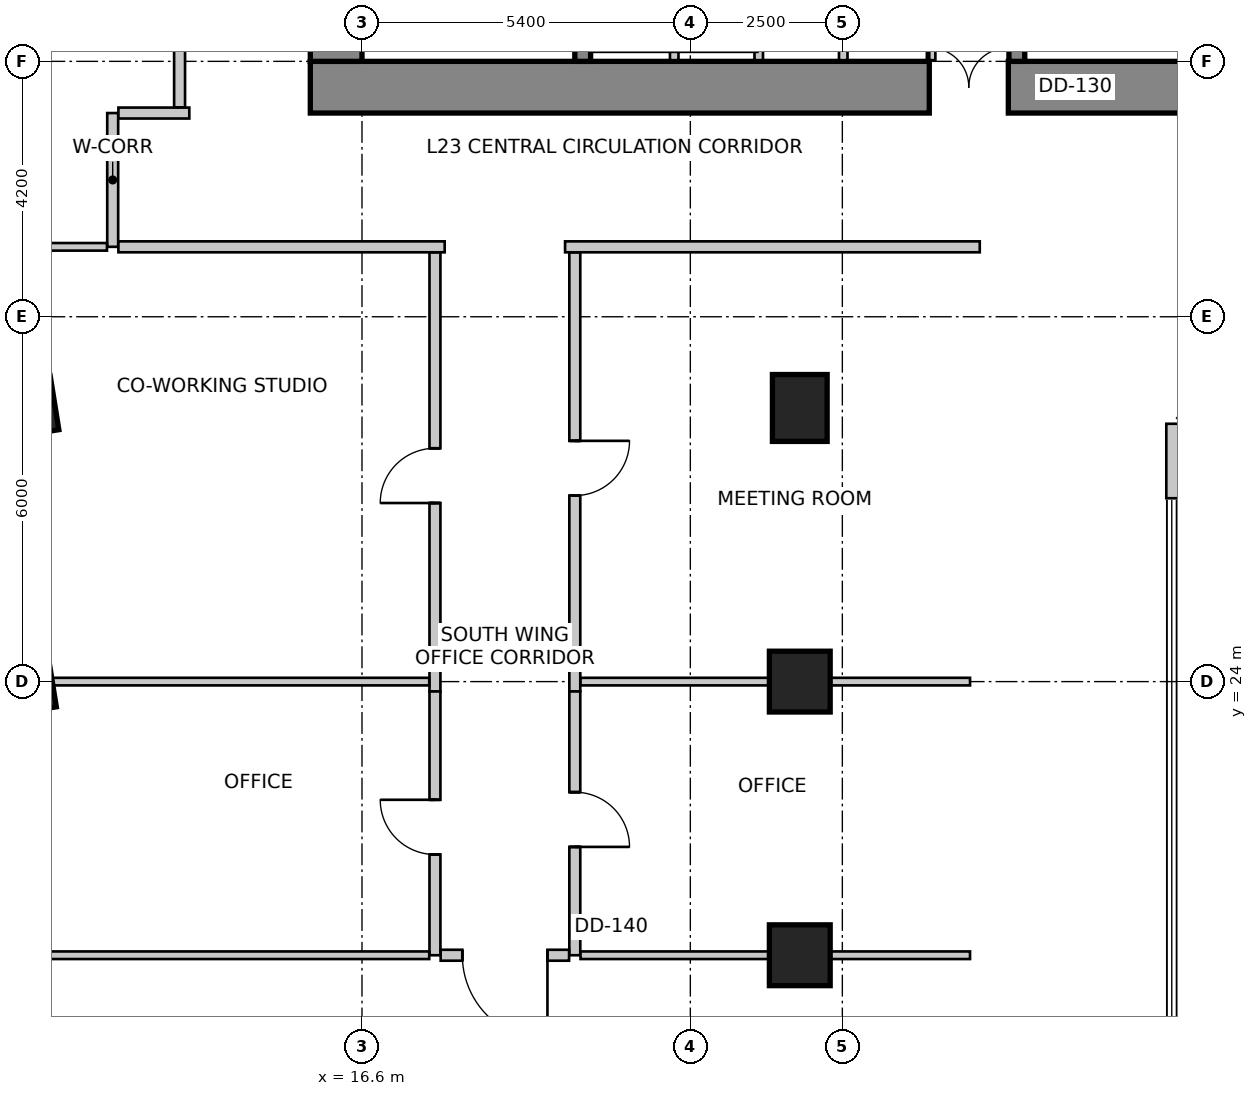
"""IFC4 building model, lengths in metres.
Left out: names, types, materials, properties, quantities, classifications, styles, units other than length and angle.
Written with IfcOpenShell. Run it as: python <this file> out.ifc"""

import sys

from ifc_helpers import new_model, si_unit, direction, frame, frame_2d, origin, origin_2d, place, context, subcontext, project, spatial, rectangle, extrude, source, transform, mapped, element, fill, save


model = new_model("IFC4")
c1 = context("Model", 3, precision=1e-05, world=origin(), true_north=direction((0.0, 1.0)))
c2 = subcontext(c1, "Body", "Model", "MODEL_VIEW")
j1 = project(units=[si_unit("LENGTHUNIT", "METRE"), si_unit("PLANEANGLEUNIT", "RADIAN")], contexts=[c1])
p1 = place(None, origin())
s1 = spatial("IfcSite", under=j1, at=p1, CompositionType="ELEMENT")
p2 = place(p1, origin())
s2 = spatial("IfcBuilding", under=s1, at=p2, CompositionType="ELEMENT")
p3 = place(p2, frame((0.0, 0.0, 95.0)))
s3 = spatial("IfcBuildingStorey", under=s2, at=p3, CompositionType="ELEMENT", Elevation=95.0)
p4 = place(p3, frame((15.75, 33.775, 0.0), z_axis=(0.0, 0.0, 1.0), x_axis=(1.0, 0.0, 0.0)))
e1 = element("IfcWall", 1, at=p4, inside=s3, PredefinedType="SHEAR", context=c2, shape_type="SweptSolid", body=[
    extrude(rectangle(XDim=16.1, YDim=0.85, at=frame_2d((8.05, 0.0))), origin(), (0.0, 0.0, 1.0), 4.0),
])
m1 = source(origin(), c2, "Body", "SweptSolid", [
    extrude(rectangle(XDim=1.3, YDim=2.15, at=frame_2d((0.65, 1.075))), frame((0.0, 0.435, 0.0), z_axis=(0.0, -1.0, 0.0), x_axis=(1.0, 0.0, 0.0)), (0.0, 0.0, 1.0), 0.87),
])
p5 = place(p4, frame((10.18, 0.0, 0.0)))
e2 = element("IfcOpeningElement", 2, at=p5, cuts=e1, PredefinedType="OPENING", context=c2, shape_type="MappedRepresentation", body=[
    mapped(m1, transform((0.0, 0.0, 0.0), scale=1.0)),
])
p6 = place(p3, frame((16.175, 34.2, 0.0), z_axis=(0.0, 0.0, 1.0), x_axis=(0.0, 1.0, 0.0)))
e3 = element("IfcWall", 3, at=p6, inside=s3, PredefinedType="SHEAR", context=c2, shape_type="SweptSolid", body=[
    extrude(rectangle(XDim=11.4, YDim=0.85, at=frame_2d((5.7, 0.0))), origin(), (0.0, 0.0, 1.0), 4.0),
])
m2 = source(origin(), c2, "Body", "SweptSolid", [
    extrude(rectangle(XDim=1.1, YDim=2.15, at=frame_2d((0.55, 1.075))), frame((0.0, 0.435, 0.0), z_axis=(0.0, -1.0, 0.0), x_axis=(1.0, 0.0, 0.0)), (0.0, 0.0, 1.0), 0.87),
])
p7 = place(p6, frame((7.15, 0.0, 0.0)))
e4 = element("IfcOpeningElement", 4, at=p7, cuts=e3, PredefinedType="OPENING", context=c2, shape_type="MappedRepresentation", body=[
    mapped(m2, transform((0.0, 0.0, 0.0), scale=1.0)),
])
p8 = place(p3, frame((20.23, 34.2, 0.0), z_axis=(0.0, 0.0, 1.0), x_axis=(0.0, 1.0, 0.0)))
e5 = element("IfcWall", 5, at=p8, inside=s3, PredefinedType="SHEAR", context=c2, shape_type="SweptSolid", body=[
    extrude(rectangle(XDim=9.06, YDim=0.26, at=frame_2d((4.53, 0.0))), origin(), (0.0, 0.0, 1.0), 4.0),
])
m3 = source(origin(), c2, "Body", "SweptSolid", [
    extrude(rectangle(XDim=1.1, YDim=2.15, at=frame_2d((0.55, 1.075))), frame((0.0, 0.14, 0.0), z_axis=(0.0, -1.0, 0.0), x_axis=(1.0, 0.0, 0.0)), (0.0, 0.0, 1.0), 0.28),
])
p9 = place(p8, frame((7.45, 0.0, 0.0)))
e6 = element("IfcOpeningElement", 6, at=p9, cuts=e5, PredefinedType="OPENING", context=c2, shape_type="MappedRepresentation", body=[
    mapped(m3, transform((0.0, 0.0, 0.0), scale=1.0)),
])
p10 = place(p3, frame((27.37, 34.2, 0.0), z_axis=(0.0, 0.0, 1.0), x_axis=(0.0, 1.0, 0.0)))
e7 = element("IfcWall", 7, at=p10, inside=s3, PredefinedType="SHEAR", context=c2, shape_type="SweptSolid", body=[
    extrude(rectangle(XDim=9.06, YDim=0.26, at=frame_2d((4.53, 0.0))), origin(), (0.0, 0.0, 1.0), 4.0),
])
p11 = place(p10, frame((7.45, 0.0, 0.0)))
e8 = element("IfcOpeningElement", 8, at=p11, cuts=e7, PredefinedType="OPENING", context=c2, shape_type="MappedRepresentation", body=[
    mapped(m3, transform((0.0, 0.0, 0.0), scale=1.0)),
])
m4 = source(origin(), c2, "Body", "SweptSolid", [
    extrude(rectangle(XDim=0.9, YDim=1.1, at=origin_2d()), origin(), (0.0, 0.0, 1.0), 4.0),
])
p12 = place(p3, frame((11.0, 28.5, 0.0), z_axis=(0.0, 0.0, 1.0), x_axis=(0.158158067254, -0.987413806751, 0.0)))
e9 = element("IfcColumn", 9, at=p12, inside=s3, PredefinedType="COLUMN", context=c2, shape_type="MappedRepresentation", body=[
    mapped(m4, transform((0.0, 0.0, 0.0), scale=1.0)),
])
m5 = source(origin(), c2, "Body", "SweptSolid", [
    extrude(rectangle(XDim=1.0, YDim=1.0, at=origin_2d()), origin(), (0.0, 0.0, 1.0), 4.0),
])
p13 = place(p3, frame((11.0, 24.0, 0.0), z_axis=(0.0, 0.0, 1.0), x_axis=(0.158158067254, -0.987413806751, 0.0)))
e10 = element("IfcColumn", 10, at=p13, inside=s3, PredefinedType="COLUMN", context=c2, shape_type="MappedRepresentation", body=[
    mapped(m5, transform((0.0, 0.0, 0.0), scale=1.0)),
])
p14 = place(p3, frame((23.8, 28.5, 0.0), z_axis=(0.0, 0.0, 1.0), x_axis=(1.0, 0.0, 0.0)))
e11 = element("IfcColumn", 11, at=p14, inside=s3, PredefinedType="COLUMN", context=c2, shape_type="MappedRepresentation", body=[
    mapped(m4, transform((0.0, 0.0, 0.0), scale=1.0)),
])
for number, where, z_axis, x_axis in (
    (12, (23.8, 24.0, 0.0), (0.0, 0.0, 1.0), (1.0, 0.0, 0.0)),
    (13, (23.8, 19.5, 0.0), (0.0, 0.0, 1.0), (1.0, 0.0, 0.0)),
):
    element("IfcColumn", number, at=place(p3, frame(where, z_axis=z_axis, x_axis=x_axis)), inside=s3, PredefinedType="COLUMN", context=c2, shape_type="MappedRepresentation", body=[
        mapped(m5, transform((0.0, 0.0, 0.0), scale=1.0)),
    ])
p15 = place(p3, frame((29.978, 27.015, 0.0), z_axis=(0.0, 0.0, 1.0), x_axis=(0.0, 1.0, 0.0)))
e14 = element("IfcWall", 14, at=p15, inside=s3, PredefinedType="SOLIDWALL", context=c2, shape_type="SweptSolid", body=[
    extrude(rectangle(XDim=1.225, YDim=0.3, at=frame_2d((0.612, 0.0))), origin(), (0.0, 0.0, 1.0), 3.7),
])
p16 = place(p3, frame((13.269, 47.134, 0.0), z_axis=(0.0, 0.0, 1.0), x_axis=(-0.319920423265, -0.947444416722, 0.0)))
e15 = element("IfcWall", 15, at=p16, inside=s3, PredefinedType="SOLIDWALL", context=c2, shape_type="SweptSolid", body=[
    extrude(rectangle(XDim=16.135, YDim=0.3, at=frame_2d((8.067, 0.0))), origin(), (0.0, 0.0, 1.0), 3.7),
])
m6 = source(origin(), c2, "Body", "SweptSolid", [
    extrude(rectangle(XDim=2.4, YDim=2.2, at=frame_2d((1.2, 1.1))), frame((0.0, 0.16, 0.0), z_axis=(0.0, -1.0, 0.0), x_axis=(1.0, 0.0, 0.0)), (0.0, 0.0, 1.0), 0.32),
])
p17 = place(p16, frame((2.188, 0.0, 0.85)))
e16 = element("IfcOpeningElement", 16, at=p17, cuts=e15, PredefinedType="OPENING", context=c2, shape_type="MappedRepresentation", body=[
    mapped(m6, transform((0.0, 0.0, 0.0), scale=1.0)),
])
m7 = source(origin(), c2, "Body", "SweptSolid", [
    extrude(rectangle(XDim=2.8, YDim=2.4, at=frame_2d((1.4, 1.2))), frame((0.0, 0.16, 0.0), z_axis=(0.0, -1.0, 0.0), x_axis=(1.0, 0.0, 0.0)), (0.0, 0.0, 1.0), 0.32),
])
p18 = place(p16, frame((6.959, 0.0, 0.85)))
e17 = element("IfcOpeningElement", 17, at=p18, cuts=e15, PredefinedType="OPENING", context=c2, shape_type="MappedRepresentation", body=[
    mapped(m7, transform((0.0, 0.0, 0.0), scale=1.0)),
])
p19 = place(p16, frame((12.13, 0.0, 0.85)))
e18 = element("IfcOpeningElement", 18, at=p19, cuts=e15, PredefinedType="OPENING", context=c2, shape_type="MappedRepresentation", body=[
    mapped(m6, transform((0.0, 0.0, 0.0), scale=1.0)),
])
p20 = place(p3, frame((8.183, 31.833, 0.0), z_axis=(0.0, 0.0, 1.0), x_axis=(0.18216364648, -0.983268226834, 0.0)))
e19 = element("IfcWall", 19, at=p20, inside=s3, PredefinedType="SOLIDWALL", context=c2, shape_type="SweptSolid", body=[
    extrude(rectangle(XDim=26.678, YDim=0.3, at=frame_2d((13.339, 0.0))), origin(), (0.0, 0.0, 1.0), 3.7),
])
p21 = place(p20, frame((2.952, 0.0, 0.85)))
e20 = element("IfcOpeningElement", 20, at=p21, cuts=e19, PredefinedType="OPENING", context=c2, shape_type="MappedRepresentation", body=[
    mapped(m7, transform((0.0, 0.0, 0.0), scale=1.0)),
])
p22 = place(p20, frame((8.876, 0.0, 0.85)))
e21 = element("IfcOpeningElement", 21, at=p22, cuts=e19, PredefinedType="OPENING", context=c2, shape_type="MappedRepresentation", body=[
    mapped(m7, transform((0.0, 0.0, 0.0), scale=1.0)),
])
p23 = place(p20, frame((13.647, 0.0, 0.85)))
e22 = element("IfcOpeningElement", 22, at=p23, cuts=e19, PredefinedType="OPENING", context=c2, shape_type="MappedRepresentation", body=[
    mapped(m7, transform((0.0, 0.0, 0.0), scale=1.0)),
])
p24 = place(p20, frame((18.372, 0.0, 0.85)))
e23 = element("IfcOpeningElement", 23, at=p24, cuts=e19, PredefinedType="OPENING", context=c2, shape_type="MappedRepresentation", body=[
    mapped(m6, transform((0.0, 0.0, 0.0), scale=1.0)),
])
p25 = place(p20, frame((22.696, 0.0, 0.85)))
e24 = element("IfcOpeningElement", 24, at=p25, cuts=e19, PredefinedType="OPENING", context=c2, shape_type="MappedRepresentation", body=[
    mapped(m7, transform((0.0, 0.0, 0.0), scale=1.0)),
])
for number, where, z_axis, x_axis in (
    (25, (25.96, 34.22, 0.0), (0.0, 0.0, 1.0), (0.0, 1.0, 0.0)),
    (26, (21.735, 34.22, 0.0), (0.0, 0.0, 1.0), (0.0, 1.0, 0.0)),
    (27, (23.125, 34.22, 0.0), (0.0, 0.0, 1.0), (0.0, 1.0, 0.0)),
    (28, (24.515, 34.22, 0.0), (0.0, 0.0, 1.0), (0.0, 1.0, 0.0)),
):
    element("IfcWall", number, at=place(p3, frame(where, z_axis=z_axis, x_axis=x_axis)), inside=s3, PredefinedType="SOLIDWALL", context=c2, shape_type="SweptSolid", body=[
        extrude(rectangle(XDim=1.62, YDim=0.14, at=frame_2d((0.81, 0.0))), origin(), (0.0, 0.0, 1.0), 2.992),
    ])
p26 = place(p3, frame((12.5, 31.15, 0.0), z_axis=(0.0, 0.0, 1.0), x_axis=(0.0, 1.0, 0.0)))
e29 = element("IfcWall", 29, at=p26, inside=s3, PredefinedType="PARTITIONING", context=c2, shape_type="SweptSolid", body=[
    extrude(rectangle(XDim=2.2, YDim=0.18, at=frame_2d((1.1, 0.0))), origin(), (0.0, 0.0, 1.0), 3.384),
])
p27 = place(p3, frame((12.594, 33.35, 0.0), z_axis=(0.0, 0.0, 1.0), x_axis=(1.0, 0.0, 0.0)))
e30 = element("IfcWall", 30, at=p27, inside=s3, PredefinedType="PARTITIONING", context=c2, shape_type="SweptSolid", body=[
    extrude(rectangle(XDim=1.166, YDim=0.18, at=frame_2d((0.583, 0.0))), origin(), (0.0, 0.0, 1.0), 3.7),
])
p28 = place(p3, frame((17.96, 31.15, 0.0), z_axis=(0.0, 0.0, 1.0), x_axis=(-1.0, 0.0, 0.0)))
e31 = element("IfcWall", 31, at=p28, inside=s3, PredefinedType="PARTITIONING", context=c2, shape_type="SweptSolid", body=[
    extrude(rectangle(XDim=5.366, YDim=0.18, at=frame_2d((2.683, 0.0))), origin(), (0.0, 0.0, 1.0), 3.384),
])
p29 = place(p3, frame((26.76, 31.15, 0.0), z_axis=(0.0, 0.0, 1.0), x_axis=(-1.0, 0.0, 0.0)))
e32 = element("IfcWall", 32, at=p29, inside=s3, PredefinedType="PARTITIONING", context=c2, shape_type="SweptSolid", body=[
    extrude(rectangle(XDim=6.82, YDim=0.18, at=frame_2d((3.41, 0.0))), origin(), (0.0, 0.0, 1.0), 3.384),
])
p30 = place(p3, frame((13.6, 33.444, 0.0), z_axis=(0.0, 0.0, 1.0), x_axis=(0.0, 1.0, 0.0)))
e33 = element("IfcWall", 33, at=p30, inside=s3, PredefinedType="PARTITIONING", context=c2, shape_type="SweptSolid", body=[
    extrude(rectangle(XDim=13.896, YDim=0.18, at=frame_2d((6.948, 0.0))), origin(), (0.0, 0.0, 1.0), 2.842),
])
m8 = source(origin(), c2, "Body", "SweptSolid", [
    extrude(rectangle(XDim=0.9, YDim=2.15, at=frame_2d((0.45, 1.075))), frame((0.0, 0.1, 0.0), z_axis=(0.0, -1.0, 0.0), x_axis=(1.0, 0.0, 0.0)), (0.0, 0.0, 1.0), 0.2),
])
p31 = place(p30, frame((4.144, 0.0, 0.0)))
e34 = element("IfcOpeningElement", 34, at=p31, cuts=e33, PredefinedType="OPENING", context=c2, shape_type="MappedRepresentation", body=[
    mapped(m8, transform((0.0, 0.0, 0.0), scale=1.0)),
])
p32 = place(p3, frame((12.406, 31.15, 0.0), z_axis=(0.0, 0.0, 1.0), x_axis=(-1.0, 0.0, 0.0)))
e35 = element("IfcWall", 35, at=p32, inside=s3, PredefinedType="PARTITIONING", context=c2, shape_type="SweptSolid", body=[
    extrude(rectangle(XDim=3.979, YDim=0.125, at=frame_2d((1.99, 0.0))), origin(), (0.0, 0.0, 1.0), 2.842),
])
p33 = place(p3, frame((17.8, 23.84, 0.0), z_axis=(0.0, 0.0, 1.0), x_axis=(0.0, 1.0, 0.0)))
e36 = element("IfcWall", 36, at=p33, inside=s3, PredefinedType="PARTITIONING", context=c2, shape_type="SweptSolid", body=[
    extrude(rectangle(XDim=7.216, YDim=0.18, at=frame_2d((3.608, 0.0))), origin(), (0.0, 0.0, 1.0), 3.075),
])
p34 = place(p33, frame((3.097, 0.0, 0.0)))
e37 = element("IfcOpeningElement", 37, at=p34, cuts=e36, PredefinedType="OPENING", context=c2, shape_type="MappedRepresentation", body=[
    mapped(m8, transform((0.0, 0.0, 0.0), scale=1.0)),
])
p35 = place(p3, frame((17.8, 19.5, 0.0), z_axis=(0.0, 0.0, 1.0), x_axis=(0.0, 1.0, 0.0)))
e38 = element("IfcWall", 38, at=p35, inside=s3, PredefinedType="PARTITIONING", context=c2, shape_type="SweptSolid", body=[
    extrude(rectangle(XDim=4.338, YDim=0.18, at=frame_2d((2.169, 0.0))), origin(), (0.0, 0.0, 1.0), 3.272),
])
p36 = place(p35, frame((1.656, 0.0, 0.0)))
e39 = element("IfcOpeningElement", 39, at=p36, cuts=e38, PredefinedType="OPENING", context=c2, shape_type="MappedRepresentation", body=[
    mapped(m8, transform((0.0, 0.0, 0.0), scale=1.0)),
])
p37 = place(p3, frame((20.1, 31.056, 0.0), z_axis=(0.0, 0.0, 1.0), x_axis=(0.0, -1.0, 0.0)))
e40 = element("IfcWall", 40, at=p37, inside=s3, PredefinedType="PARTITIONING", context=c2, shape_type="SweptSolid", body=[
    extrude(rectangle(XDim=7.216, YDim=0.18, at=frame_2d((3.608, 0.0))), origin(), (0.0, 0.0, 1.0), 3.075),
])
p38 = place(p37, frame((3.097, 0.0, 0.0)))
e41 = element("IfcOpeningElement", 41, at=p38, cuts=e40, PredefinedType="OPENING", context=c2, shape_type="MappedRepresentation", body=[
    mapped(m8, transform((0.0, 0.0, 0.0), scale=1.0)),
])
p39 = place(p3, frame((20.1, 23.838, 0.0), z_axis=(0.0, 0.0, 1.0), x_axis=(0.0, -1.0, 0.0)))
e42 = element("IfcWall", 42, at=p39, inside=s3, PredefinedType="PARTITIONING", context=c2, shape_type="SweptSolid", body=[
    extrude(rectangle(XDim=4.338, YDim=0.18, at=frame_2d((2.169, 0.0))), origin(), (0.0, 0.0, 1.0), 3.272),
])
p40 = place(p39, frame((1.656, 0.0, 0.0)))
e43 = element("IfcOpeningElement", 43, at=p40, cuts=e42, PredefinedType="OPENING", context=c2, shape_type="MappedRepresentation", body=[
    mapped(m8, transform((0.0, 0.0, 0.0), scale=1.0)),
])
p41 = place(p3, frame((20.006, 19.5, 0.0), z_axis=(0.0, 0.0, 1.0), x_axis=(-1.0, 0.0, 0.0)))
e44 = element("IfcWall", 44, at=p41, inside=s3, PredefinedType="PARTITIONING", context=c2, shape_type="SweptSolid", body=[
    extrude(rectangle(XDim=2.112, YDim=0.18, at=frame_2d((1.056, 0.0))), origin(), (0.0, 0.0, 1.0), 3.7),
])
m9 = source(origin(), c2, "Body", "SweptSolid", [
    extrude(rectangle(XDim=1.4, YDim=2.15, at=frame_2d((0.7, 1.075))), frame((0.0, 0.1, 0.0), z_axis=(0.0, -1.0, 0.0), x_axis=(1.0, 0.0, 0.0)), (0.0, 0.0, 1.0), 0.2),
])
p42 = place(p41, frame((0.356, 0.0, 0.0)))
e45 = element("IfcOpeningElement", 45, at=p42, cuts=e44, PredefinedType="OPENING", context=c2, shape_type="MappedRepresentation", body=[
    mapped(m9, transform((0.0, 0.0, 0.0), scale=1.0)),
])
p43 = place(p3, frame((17.706, 24.0, 0.0), z_axis=(0.0, 0.0, 1.0), x_axis=(-1.0, 0.0, 0.0)))
e46 = element("IfcWall", 46, at=p43, inside=s3, PredefinedType="PARTITIONING", context=c2, shape_type="SweptSolid", body=[
    extrude(rectangle(XDim=7.954, YDim=0.125, at=frame_2d((3.977, 0.0))), origin(), (0.0, 0.0, 1.0), 2.842),
])
p44 = place(p3, frame((17.706, 19.5, 0.0), z_axis=(0.0, 0.0, 1.0), x_axis=(-1.0, 0.0, 0.0)))
e47 = element("IfcWall", 47, at=p44, inside=s3, PredefinedType="PARTITIONING", context=c2, shape_type="SweptSolid", body=[
    extrude(rectangle(XDim=7.121, YDim=0.125, at=frame_2d((3.561, 0.0))), origin(), (0.0, 0.0, 1.0), 3.7),
])
for number, where, z_axis, x_axis in (
    (48, (26.6, 24.0, 0.0), (0.0, 0.0, 1.0), (-1.0, 0.0, 0.0)),
    (49, (26.6, 19.5, 0.0), (0.0, 0.0, 1.0), (-1.0, 0.0, 0.0)),
):
    element("IfcWall", number, at=place(p3, frame(where, z_axis=z_axis, x_axis=x_axis)), inside=s3, PredefinedType="PARTITIONING", context=c2, shape_type="SweptSolid", body=[
        extrude(rectangle(XDim=6.406, YDim=0.125, at=frame_2d((3.203, 0.0))), origin(), (0.0, 0.0, 1.0), 2.842),
    ])
m10 = source(origin(), c2, "Body", "SweptSolid", [
    extrude(rectangle(XDim=1.3, YDim=2.15, at=frame_2d((0.65, 1.075))), frame((0.0, 0.025, 0.0), z_axis=(0.0, -1.0, 0.0), x_axis=(1.0, 0.0, 0.0)), (0.0, 0.0, 1.0), 0.05),
])
p45 = place(p5, origin())
e50 = element("IfcDoor", 50, at=p45, inside=s3, OperationType="DOUBLE_DOOR_SINGLE_SWING", PredefinedType="DOOR", context=c2, shape_type="MappedRepresentation", body=[
    mapped(m10, transform((0.0, 0.0, 0.0), scale=1.0)),
])
fill(e2, e50)
m11 = source(origin(), c2, "Body", "SweptSolid", [
    extrude(rectangle(XDim=0.9, YDim=2.15, at=frame_2d((0.45, 1.075))), frame((0.0, 0.025, 0.0), z_axis=(0.0, -1.0, 0.0), x_axis=(1.0, 0.0, 0.0)), (0.0, 0.0, 1.0), 0.05),
])
p46 = place(p34, origin())
e51 = element("IfcDoor", 51, at=p46, inside=s3, OperationType="SINGLE_SWING_LEFT", PredefinedType="DOOR", context=c2, shape_type="MappedRepresentation", body=[
    mapped(m11, transform((0.0, 0.0, 0.0), scale=1.0)),
])
fill(e37, e51)
p47 = place(p36, origin())
e52 = element("IfcDoor", 52, at=p47, inside=s3, OperationType="SINGLE_SWING_RIGHT", PredefinedType="DOOR", context=c2, shape_type="MappedRepresentation", body=[
    mapped(m11, transform((0.0, 0.0, 0.0), scale=1.0)),
])
fill(e39, e52)
p48 = place(p38, origin())
e53 = element("IfcDoor", 53, at=p48, inside=s3, OperationType="SINGLE_SWING_LEFT", PredefinedType="DOOR", context=c2, shape_type="MappedRepresentation", body=[
    mapped(m11, transform((0.0, 0.0, 0.0), scale=1.0)),
])
fill(e41, e53)
p49 = place(p40, origin())
e54 = element("IfcDoor", 54, at=p49, inside=s3, OperationType="SINGLE_SWING_RIGHT", PredefinedType="DOOR", context=c2, shape_type="MappedRepresentation", body=[
    mapped(m11, transform((0.0, 0.0, 0.0), scale=1.0)),
])
fill(e43, e54)
m12 = source(origin(), c2, "Body", "SweptSolid", [
    extrude(rectangle(XDim=1.4, YDim=2.15, at=frame_2d((0.7, 1.075))), frame((0.0, 0.025, 0.0), z_axis=(0.0, -1.0, 0.0), x_axis=(1.0, 0.0, 0.0)), (0.0, 0.0, 1.0), 0.05),
])
p50 = place(p42, origin())
e55 = element("IfcDoor", 55, at=p50, inside=s3, OperationType="SINGLE_SWING_LEFT", PredefinedType="DOOR", context=c2, shape_type="MappedRepresentation", body=[
    mapped(m12, transform((0.0, 0.0, 0.0), scale=1.0)),
])
fill(e45, e55)
save(model, sys.argv[1])
